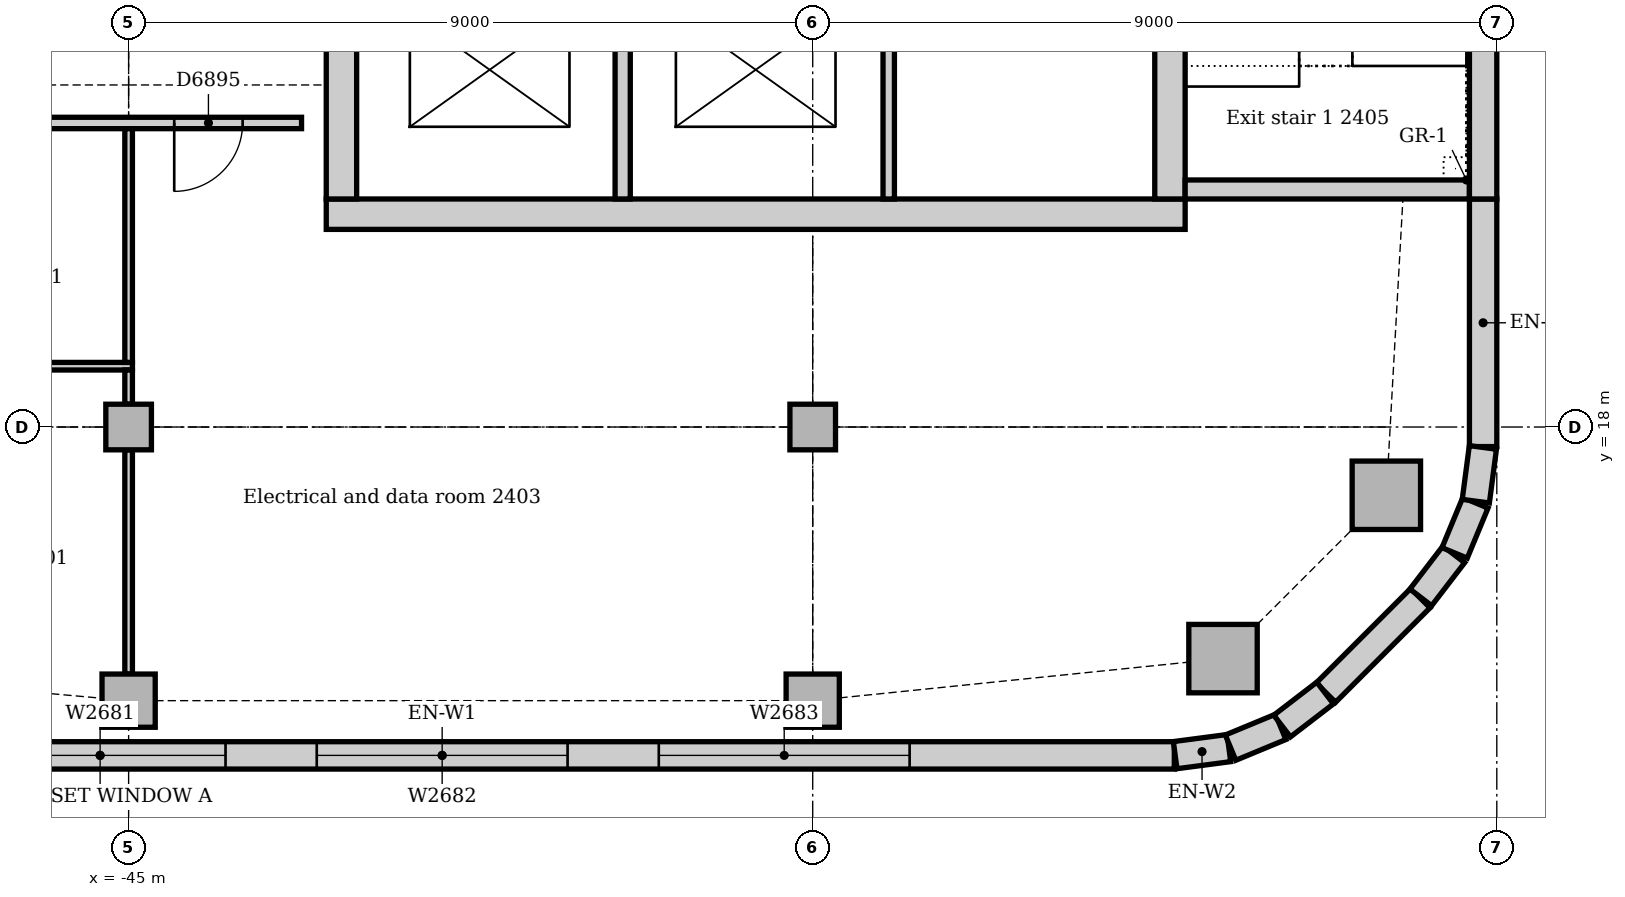
"""IFC4 building model, lengths in metres.
Left out: names, types, materials, properties, quantities, classifications, styles, units other than length and angle.
Written with IfcOpenShell. Run it as: python <this file> out.ifc"""

import sys

from ifc_helpers import new_model, si_unit, direction, frame, frame_2d, origin, origin_2d, place, context, subcontext, project, spatial, rectangle, extrude, element, fill, save


model = new_model("IFC4")
c1 = context("Model", 3, precision=1e-05, world=origin(), true_north=direction((0.0, 1.0)))
c2 = subcontext(c1, "Body", "Model", "MODEL_VIEW")
j1 = project(units=[si_unit("LENGTHUNIT", "METRE"), si_unit("PLANEANGLEUNIT", "RADIAN")], contexts=[c1])
p1 = place(None, origin())
s1 = spatial("IfcSite", under=j1, at=p1, CompositionType="ELEMENT")
p2 = place(p1, origin())
s2 = spatial("IfcBuilding", under=s1, at=p2, CompositionType="ELEMENT")
p3 = place(p2, frame((0.0, 0.0, 104.0)))
s3 = spatial("IfcBuildingStorey", under=s2, at=p3, CompositionType="ELEMENT", Elevation=104.0)
p4 = place(p3, frame((-42.4, 20.8, 0.0), z_axis=(0.0, 0.0, 1.0), x_axis=(1.0, 0.0, 0.0)))
e1 = element("IfcWall", 1, at=p4, inside=s3, PredefinedType="SOLIDWALL", context=c2, shape_type="SweptSolid", body=[
    extrude(rectangle(XDim=11.3, YDim=0.4, at=frame_2d((5.65, 0.0))), origin(), (0.0, 0.0, 1.0), 4.0),
])
p5 = place(p3, frame((-31.3, 21.0, 0.0), z_axis=(0.0, 0.0, 1.0), x_axis=(0.0, 1.0, 0.0)))
e2 = element("IfcWall", 2, at=p5, inside=s3, PredefinedType="SOLIDWALL", context=c2, shape_type="SweptSolid", body=[
    extrude(rectangle(XDim=9.5, YDim=0.4, at=frame_2d((4.75, 0.0))), origin(), (0.0, 0.0, 1.0), 4.0),
])
p6 = place(p5, frame((5.25, 0.0, 0.0)))
e3 = element("IfcOpeningElement", 3, at=p6, cuts=e2, PredefinedType="OPENING", context=c2, shape_type="SweptSolid", body=[
    extrude(rectangle(XDim=1.0, YDim=2.1, at=frame_2d((0.5, 1.05))), frame((0.0, 0.21, 0.0), z_axis=(0.0, -1.0, 0.0), x_axis=(1.0, 0.0, 0.0)), (0.0, 0.0, 1.0), 0.42),
])
p7 = place(p3, frame((-42.2, 30.5, 0.0), z_axis=(0.0, 0.0, 1.0), x_axis=(0.0, -1.0, 0.0)))
e4 = element("IfcWall", 4, at=p7, inside=s3, PredefinedType="SOLIDWALL", context=c2, shape_type="SweptSolid", body=[
    extrude(rectangle(XDim=9.5, YDim=0.4, at=frame_2d((4.75, 0.0))), origin(), (0.0, 0.0, 1.0), 4.0),
])
p8 = place(p7, frame((3.85, 0.0, 0.0)))
e5 = element("IfcOpeningElement", 5, at=p8, cuts=e4, PredefinedType="OPENING", context=c2, shape_type="SweptSolid", body=[
    extrude(rectangle(XDim=1.8, YDim=2.1, at=frame_2d((0.9, 1.05))), frame((0.0, 0.21, 0.0), z_axis=(0.0, -1.0, 0.0), x_axis=(1.0, 0.0, 0.0)), (0.0, 0.0, 1.0), 0.42),
])
p9 = place(p3, frame((-31.1, 21.125, 0.0), z_axis=(0.0, 0.0, 1.0), x_axis=(1.0, 0.0, 0.0)))
e6 = element("IfcWall", 6, at=p9, inside=s3, PredefinedType="SOLIDWALL", context=c2, shape_type="SweptSolid", body=[
    extrude(rectangle(XDim=3.74, YDim=0.25, at=frame_2d((1.87, 0.0))), origin(), (0.0, 0.0, 1.0), 4.0),
])
for number, where, z_axis, x_axis in (
    (7, (-30.602, 14.953, 0.0), (0.0, 0.0, 1.0), (1.0, 0.0, 0.0)),
    (8, (-28.453, 17.102, 0.0), (0.0, 0.0, 1.0), (1.0, 0.0, 0.0)),
):
    element("IfcColumn", number, at=place(p3, frame(where, z_axis=z_axis, x_axis=x_axis)), inside=s3, PredefinedType="COLUMN", context=c2, shape_type="SweptSolid", body=[
        extrude(rectangle(XDim=0.9, YDim=0.9, at=origin_2d()), origin(), (0.0, 0.0, 1.0), 3.85),
    ])
for number, where, z_axis, x_axis in (
    (9, (-45.0, 14.4, 0.0), (0.0, 0.0, 1.0), (1.0, 0.0, 0.0)),
    (10, (-36.0, 14.4, 0.0), (0.0, 0.0, 1.0), (1.0, 0.0, 0.0)),
):
    element("IfcColumn", number, at=place(p3, frame(where, z_axis=z_axis, x_axis=x_axis)), inside=s3, PredefinedType="COLUMN", context=c2, shape_type="SweptSolid", body=[
        extrude(rectangle(XDim=0.7, YDim=0.7, at=origin_2d()), origin(), (0.0, 0.0, 1.0), 3.85),
    ])
for number, where, z_axis, x_axis in (
    (11, (-45.0, 18.0, 0.0), (0.0, 0.0, 1.0), (1.0, 0.0, 0.0)),
    (12, (-36.0, 18.0, 0.0), (0.0, 0.0, 1.0), (1.0, 0.0, 0.0)),
):
    element("IfcColumn", number, at=place(p3, frame(where, z_axis=z_axis, x_axis=x_axis)), inside=s3, PredefinedType="COLUMN", context=c2, shape_type="SweptSolid", body=[
        extrude(rectangle(XDim=0.6, YDim=0.6, at=origin_2d()), origin(), (0.0, 0.0, 1.0), 3.85),
    ])
p10 = place(p3, frame((-50.507, 13.68, 0.0), z_axis=(0.0, 0.0, 1.0), x_axis=(1.0, 0.0, 0.0)))
e13 = element("IfcWall", 13, at=p10, inside=s3, PredefinedType="STANDARD", context=c2, shape_type="SweptSolid", body=[
    extrude(rectangle(XDim=19.265, YDim=0.36, at=frame_2d((9.632, 0.0))), origin(), (0.0, 0.0, 1.0), 3.85),
])
p11 = place(p10, frame((3.482, 0.0, 0.9)))
e14 = element("IfcOpeningElement", 14, at=p11, cuts=e13, PredefinedType="OPENING", context=c2, shape_type="SweptSolid", body=[
    extrude(rectangle(XDim=3.3, YDim=1.6, at=frame_2d((1.65, 0.8))), frame((0.0, 0.19, 0.0), z_axis=(0.0, -1.0, 0.0), x_axis=(1.0, 0.0, 0.0)), (0.0, 0.0, 1.0), 0.38),
])
p12 = place(p10, frame((7.982, 0.0, 0.9)))
e15 = element("IfcOpeningElement", 15, at=p12, cuts=e13, PredefinedType="OPENING", context=c2, shape_type="SweptSolid", body=[
    extrude(rectangle(XDim=3.3, YDim=1.6, at=frame_2d((1.65, 0.8))), frame((0.0, 0.19, 0.0), z_axis=(0.0, -1.0, 0.0), x_axis=(1.0, 0.0, 0.0)), (0.0, 0.0, 1.0), 0.38),
])
p13 = place(p10, frame((12.482, 0.0, 0.9)))
e16 = element("IfcOpeningElement", 16, at=p13, cuts=e13, PredefinedType="OPENING", context=c2, shape_type="SweptSolid", body=[
    extrude(rectangle(XDim=3.3, YDim=1.6, at=frame_2d((1.65, 0.8))), frame((0.0, 0.19, 0.0), z_axis=(0.0, -1.0, 0.0), x_axis=(1.0, 0.0, 0.0)), (0.0, 0.0, 1.0), 0.38),
])
p14 = place(p3, frame((-29.249, 14.506, 0.0), z_axis=(0.0, 0.0, 1.0), x_axis=(0.707106781187, 0.707106781187, 0.0)))
e17 = element("IfcWall", 17, at=p14, inside=s3, PredefinedType="STANDARD", context=c2, shape_type="SweptSolid", body=[
    extrude(rectangle(XDim=1.757, YDim=0.36, at=frame_2d((0.879, 0.0))), origin(), (0.0, 0.0, 1.0), 3.85),
])
p15 = place(p3, frame((-27.18, 17.743, 0.0), z_axis=(0.0, 0.0, 1.0), x_axis=(0.0, 1.0, 0.0)))
e18 = element("IfcWall", 18, at=p15, inside=s3, PredefinedType="STANDARD", context=c2, shape_type="SweptSolid", body=[
    extrude(rectangle(XDim=3.257, YDim=0.36, at=frame_2d((1.629, 0.0))), origin(), (0.0, 0.0, 1.0), 3.85),
])
p16 = place(p3, frame((-27.18, 21.0, 0.0), z_axis=(0.0, 0.0, 1.0), x_axis=(0.0, 1.0, 0.0)))
e19 = element("IfcWall", 19, at=p16, inside=s3, PredefinedType="STANDARD", context=c2, shape_type="SweptSolid", body=[
    extrude(rectangle(XDim=6.75, YDim=0.36, at=frame_2d((3.375, 0.0))), origin(), (0.0, 0.0, 1.0), 3.85),
])
for number, where, z_axis, x_axis in (
    (20, (-31.231, 13.683, 0.0), (0.0, 0.0, 1.0), (0.991, 0.131, 0.0)),
    (21, (-30.503, 13.782, 0.0), (0.0, 0.0, 1.0), (0.924, 0.383, 0.0)),
):
    element("IfcWall", number, at=place(p3, frame(where, z_axis=z_axis, x_axis=x_axis)), inside=s3, PredefinedType="STANDARD", context=c2, shape_type="SweptSolid", body=[
        extrude(rectangle(XDim=0.713, YDim=0.36, at=frame_2d((0.356, 0.0))), origin(), (0.0, 0.0, 1.0), 3.85),
    ])
for number, where, z_axis, x_axis in (
    (22, (-29.825, 14.066, 0.0), (0.0, 0.0, 1.0), (0.793, 0.609, 0.0)),
    (23, (-28.0, 15.759, 0.0), (0.0, 0.0, 1.0), (0.609, 0.793, 0.0)),
):
    element("IfcWall", number, at=place(p3, frame(where, z_axis=z_axis, x_axis=x_axis)), inside=s3, PredefinedType="STANDARD", context=c2, shape_type="SweptSolid", body=[
        extrude(rectangle(XDim=0.713, YDim=0.36, at=frame_2d((0.357, 0.0))), origin(), (0.0, 0.0, 1.0), 3.85),
    ])
for number, where, z_axis, x_axis in (
    (24, (-27.555, 16.344, 0.0), (0.0, 0.0, 1.0), (0.383, 0.924, 0.0)),
    (25, (-27.276, 17.024, 0.0), (0.0, 0.0, 1.0), (0.131, 0.991, 0.0)),
):
    element("IfcWall", number, at=place(p3, frame(where, z_axis=z_axis, x_axis=x_axis)), inside=s3, PredefinedType="STANDARD", context=c2, shape_type="SweptSolid", body=[
        extrude(rectangle(XDim=0.713, YDim=0.36, at=frame_2d((0.356, 0.0))), origin(), (0.0, 0.0, 1.0), 3.85),
    ])
p17 = place(p3, frame((-38.5, 21.0, 0.0), z_axis=(0.0, 0.0, 1.0), x_axis=(0.0, 1.0, 0.0)))
e26 = element("IfcWall", 26, at=p17, inside=s3, PredefinedType="SOLIDWALL", context=c2, shape_type="SweptSolid", body=[
    extrude(rectangle(XDim=3.1, YDim=0.2, at=frame_2d((1.55, 0.0))), origin(), (0.0, 0.0, 1.0), 4.0),
])
p18 = place(p3, frame((-35.0, 21.0, 0.0), z_axis=(0.0, 0.0, 1.0), x_axis=(0.0, 1.0, 0.0)))
e27 = element("IfcWall", 27, at=p18, inside=s3, PredefinedType="SOLIDWALL", context=c2, shape_type="SweptSolid", body=[
    extrude(rectangle(XDim=2.9, YDim=0.15, at=frame_2d((1.45, 0.0))), origin(), (0.0, 0.0, 1.0), 4.0),
])
p19 = place(p3, frame((-59.766, 22.0, 0.0), z_axis=(0.0, 0.0, 1.0), x_axis=(1.0, 0.0, 0.0)))
e28 = element("IfcWall", 28, at=p19, inside=s3, PredefinedType="PARTITIONING", context=c2, shape_type="SweptSolid", body=[
    extrude(rectangle(XDim=17.041, YDim=0.15, at=frame_2d((8.52, 0.0))), origin(), (0.0, 0.0, 1.0), 3.85),
])
p20 = place(p19, frame((15.366, 0.0, 0.0)))
e29 = element("IfcOpeningElement", 29, at=p20, cuts=e28, PredefinedType="OPENING", context=c2, shape_type="SweptSolid", body=[
    extrude(rectangle(XDim=0.9, YDim=2.1, at=frame_2d((0.45, 1.05))), frame((0.0, 0.085, 0.0), z_axis=(0.0, -1.0, 0.0), x_axis=(1.0, 0.0, 0.0)), (0.0, 0.0, 1.0), 0.17),
])
p21 = place(p19, frame((2.5, 0.0, 0.0)))
e30 = element("IfcOpeningElement", 30, at=p21, cuts=e28, PredefinedType="OPENING", context=c2, shape_type="SweptSolid", body=[
    extrude(rectangle(XDim=0.9, YDim=2.1, at=frame_2d((0.45, 1.05))), frame((0.0, 0.085, 0.0), z_axis=(0.0, -1.0, 0.0), x_axis=(1.0, 0.0, 0.0)), (0.0, 0.0, 1.0), 0.17),
])
p22 = place(p19, frame((9.056, 0.0, 0.0)))
e31 = element("IfcOpeningElement", 31, at=p22, cuts=e28, PredefinedType="OPENING", context=c2, shape_type="SweptSolid", body=[
    extrude(rectangle(XDim=1.0, YDim=2.1, at=frame_2d((0.5, 1.05))), frame((0.0, 0.085, 0.0), z_axis=(0.0, -1.0, 0.0), x_axis=(1.0, 0.0, 0.0)), (0.0, 0.0, 1.0), 0.17),
])
p23 = place(p3, frame((-54.05, 18.8, 0.0), z_axis=(0.0, 0.0, 1.0), x_axis=(1.0, 0.0, 0.0)))
e32 = element("IfcWall", 32, at=p23, inside=s3, PredefinedType="PARTITIONING", context=c2, shape_type="SweptSolid", body=[
    extrude(rectangle(XDim=9.1, YDim=0.1, at=frame_2d((4.55, 0.0))), origin(), (0.0, 0.0, 1.0), 3.85),
])
p24 = place(p23, frame((3.39, 0.0, 0.0)))
e33 = element("IfcOpeningElement", 33, at=p24, cuts=e32, PredefinedType="OPENING", context=c2, shape_type="SweptSolid", body=[
    extrude(rectangle(XDim=0.9, YDim=2.1, at=frame_2d((0.45, 1.05))), frame((0.0, 0.06, 0.0), z_axis=(0.0, -1.0, 0.0), x_axis=(1.0, 0.0, 0.0)), (0.0, 0.0, 1.0), 0.12),
])
p25 = place(p3, frame((-45.0, 18.85, 0.0), z_axis=(0.0, 0.0, 1.0), x_axis=(0.0, 1.0, 0.0)))
e34 = element("IfcWall", 34, at=p25, inside=s3, PredefinedType="PARTITIONING", context=c2, shape_type="SweptSolid", body=[
    extrude(rectangle(XDim=3.075, YDim=0.1, at=frame_2d((1.538, 0.0))), origin(), (0.0, 0.0, 1.0), 3.362),
])
p26 = place(p3, frame((-45.0, 18.3, 0.0), z_axis=(0.0, 0.0, 1.0), x_axis=(0.0, 1.0, 0.0)))
e35 = element("IfcWall", 35, at=p26, inside=s3, PredefinedType="PARTITIONING", context=c2, shape_type="SweptSolid", body=[
    extrude(rectangle(XDim=0.45, YDim=0.1, at=frame_2d((0.225, 0.0))), origin(), (0.0, 0.0, 1.0), 3.85),
])
p27 = place(p3, frame((-45.0, 14.75, 0.0), z_axis=(0.0, 0.0, 1.0), x_axis=(0.0, 1.0, 0.0)))
e36 = element("IfcWall", 36, at=p27, inside=s3, PredefinedType="PARTITIONING", context=c2, shape_type="SweptSolid", body=[
    extrude(rectangle(XDim=2.95, YDim=0.1, at=frame_2d((1.475, 0.0))), origin(), (0.0, 0.0, 1.0), 3.652),
])
p28 = place(p11, origin())
e37 = element("IfcWindow", 37, at=p28, inside=s3, PartitioningType="SINGLE_PANEL", PredefinedType="WINDOW", context=c2, shape_type="SweptSolid", body=[
    extrude(rectangle(XDim=3.3, YDim=1.6, at=frame_2d((1.65, 0.8))), frame((0.0, 0.13, 0.0), z_axis=(0.0, -1.0, 0.0), x_axis=(1.0, 0.0, 0.0)), (0.0, 0.0, 1.0), 0.06),
])
fill(e14, e37)
p29 = place(p12, origin())
e38 = element("IfcWindow", 38, at=p29, inside=s3, PartitioningType="SINGLE_PANEL", PredefinedType="WINDOW", context=c2, shape_type="SweptSolid", body=[
    extrude(rectangle(XDim=3.3, YDim=1.6, at=frame_2d((1.65, 0.8))), frame((0.0, 0.13, 0.0), z_axis=(0.0, -1.0, 0.0), x_axis=(1.0, 0.0, 0.0)), (0.0, 0.0, 1.0), 0.06),
])
fill(e15, e38)
p30 = place(p13, origin())
e39 = element("IfcWindow", 39, at=p30, inside=s3, PartitioningType="SINGLE_PANEL", PredefinedType="WINDOW", context=c2, shape_type="SweptSolid", body=[
    extrude(rectangle(XDim=3.3, YDim=1.6, at=frame_2d((1.65, 0.8))), frame((0.0, 0.13, 0.0), z_axis=(0.0, -1.0, 0.0), x_axis=(1.0, 0.0, 0.0)), (0.0, 0.0, 1.0), 0.06),
])
fill(e16, e39)
p31 = place(p20, frame((0.9, 0.0, 0.0), z_axis=(0.0, 0.0, 1.0), x_axis=(-1.0, 0.0, 0.0)))
e40 = element("IfcDoor", 40, at=p31, inside=s3, OperationType="SINGLE_SWING_RIGHT", PredefinedType="DOOR", context=c2, shape_type="SweptSolid", body=[
    extrude(rectangle(XDim=0.9, YDim=2.1, at=frame_2d((0.45, 1.05))), frame((0.0, 0.025, 0.0), z_axis=(0.0, -1.0, 0.0), x_axis=(1.0, 0.0, 0.0)), (0.0, 0.0, 1.0), 0.05),
])
fill(e29, e40)
save(model, sys.argv[1])
